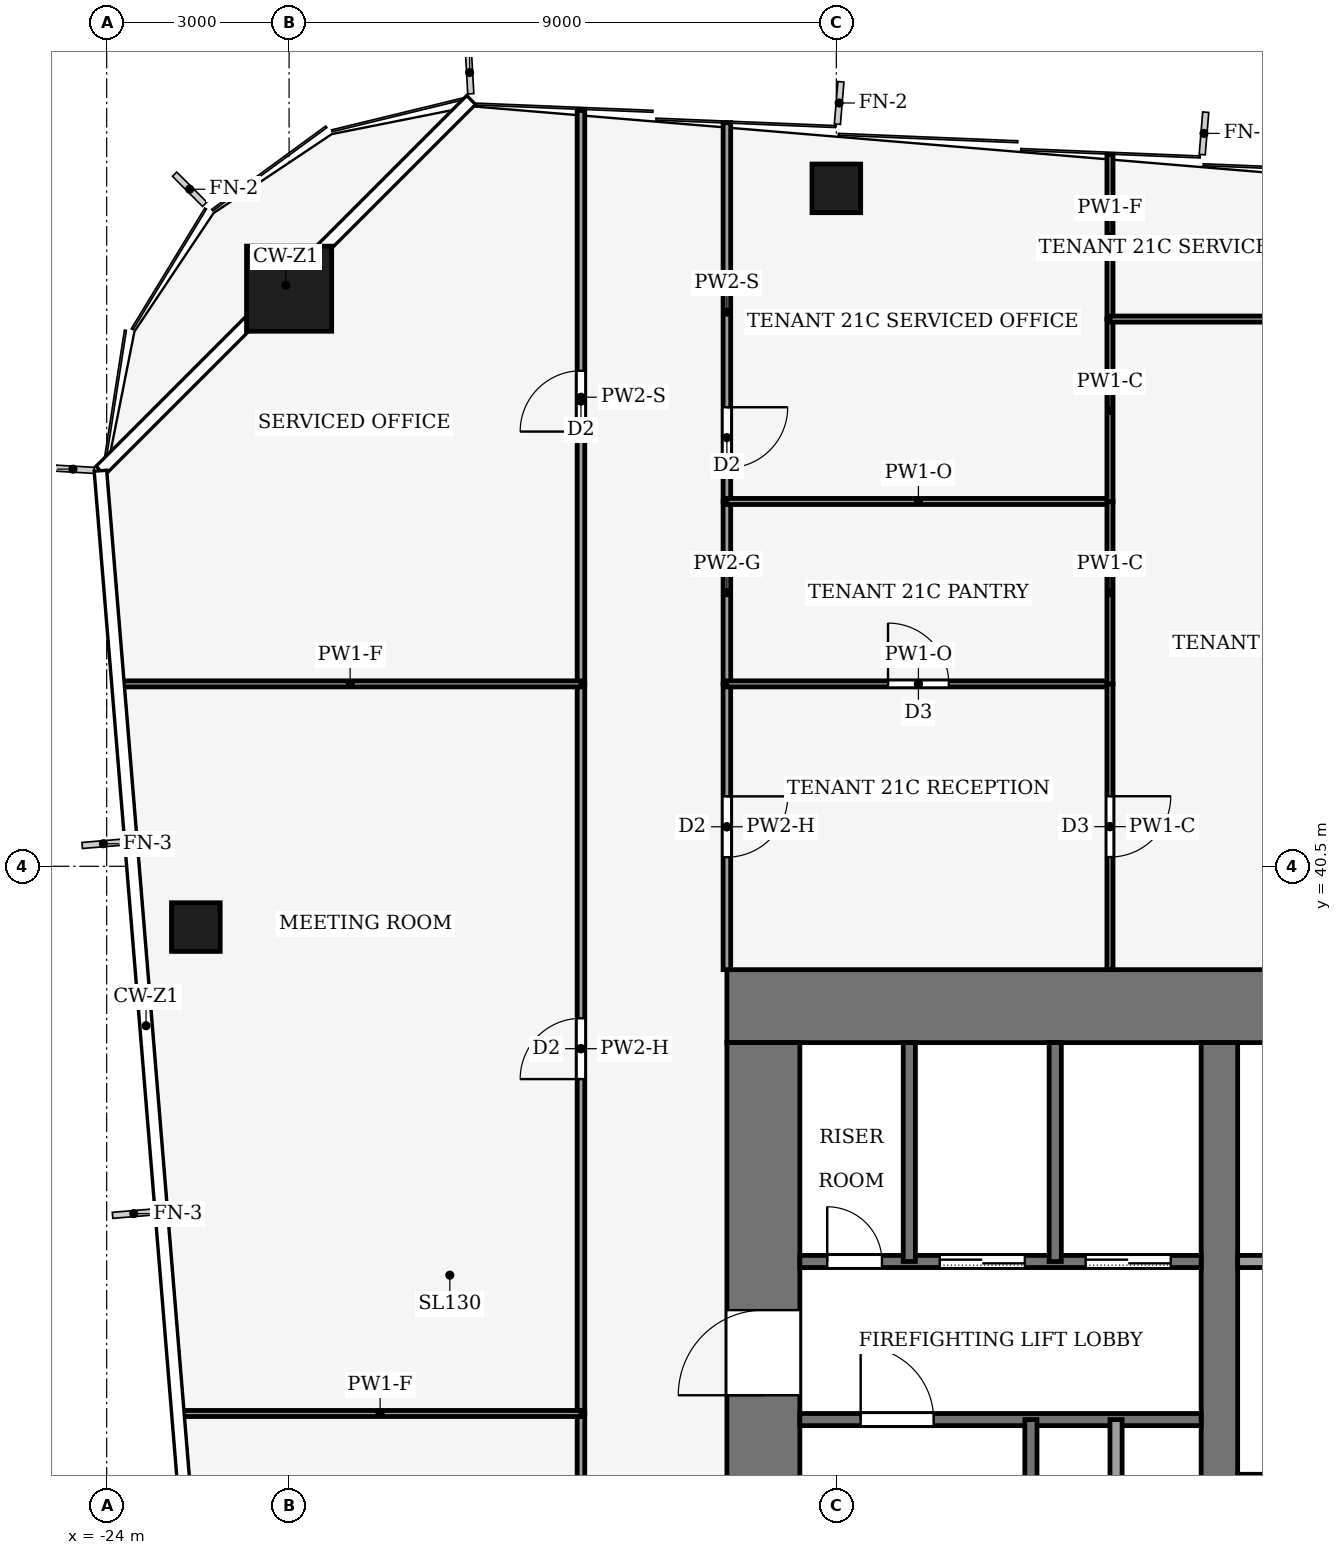
"""IFC4 building model, lengths in metres.
Left out: names, types, materials, properties, quantities, classifications, styles, units other than length and angle.
Written with IfcOpenShell. Run it as: python <this file> out.ifc"""

import sys

from ifc_helpers import new_model, si_unit, direction, frame, frame_2d, origin, origin_2d, place, context, subcontext, project, spatial, rectangle, hollow_rectangle, extrude, element, fill, save


model = new_model("IFC4")
c1 = context("Model", 3, precision=1e-05, world=origin(), true_north=direction((0.0, 1.0)))
c2 = subcontext(c1, "Body", "Model", "MODEL_VIEW")
j1 = project(units=[si_unit("LENGTHUNIT", "METRE"), si_unit("PLANEANGLEUNIT", "RADIAN")], contexts=[c1])
p1 = place(None, origin())
s1 = spatial("IfcSite", under=j1, at=p1, CompositionType="ELEMENT")
p2 = place(p1, origin())
s2 = spatial("IfcBuilding", under=s1, at=p2, CompositionType="ELEMENT")
p3 = place(p2, frame((0.0, 0.0, 94.0)))
s3 = spatial("IfcBuildingStorey", under=s2, at=p3, CompositionType="ELEMENT", Elevation=94.0)
p4 = place(p3, frame((-13.8, 38.2, -0.13), z_axis=(0.0, 0.0, 1.0), x_axis=(1.0, 0.0, 0.0)))
e1 = element("IfcWall", 1, at=p4, inside=s3, PredefinedType="SHEAR", context=c2, shape_type="SweptSolid", body=[
    extrude(rectangle(XDim=27.6, YDim=1.2, at=frame_2d((13.8, 0.0))), origin(), (0.0, 0.0, 1.0), 4.0),
])
p5 = place(p3, frame((-13.2, 18.4, -0.13), z_axis=(0.0, 0.0, 1.0), x_axis=(0.0, 1.0, 0.0)))
e2 = element("IfcWall", 2, at=p5, inside=s3, PredefinedType="SHEAR", context=c2, shape_type="SweptSolid", body=[
    extrude(rectangle(XDim=19.2, YDim=1.2, at=frame_2d((9.6, 0.0))), origin(), (0.0, 0.0, 1.0), 4.0),
])
p6 = place(p5, frame((2.8, 0.0, 0.13)))
e3 = element("IfcOpeningElement", 3, at=p6, cuts=e2, PredefinedType="OPENING", context=c2, shape_type="SweptSolid", body=[
    extrude(rectangle(XDim=2.4, YDim=2.4, at=frame_2d((1.2, 1.2))), frame((0.0, 0.61, 0.0), z_axis=(0.0, -1.0, 0.0), x_axis=(1.0, 0.0, 0.0)), (0.0, 0.0, 1.0), 1.22),
])
p7 = place(p5, frame((13.4, 0.0, 0.13)))
e4 = element("IfcOpeningElement", 4, at=p7, cuts=e2, PredefinedType="OPENING", context=c2, shape_type="SweptSolid", body=[
    extrude(rectangle(XDim=1.4, YDim=2.2, at=frame_2d((0.7, 1.1))), frame((0.0, 0.61, 0.0), z_axis=(0.0, -1.0, 0.0), x_axis=(1.0, 0.0, 0.0)), (0.0, 0.0, 1.0), 1.22),
])
p8 = place(p3, frame((-5.7, 18.4, -0.13), z_axis=(0.0, 0.0, 1.0), x_axis=(0.0, 1.0, 0.0)))
e5 = element("IfcWall", 5, at=p8, inside=s3, PredefinedType="SHEAR", context=c2, shape_type="SweptSolid", body=[
    extrude(rectangle(XDim=19.2, YDim=0.6, at=frame_2d((9.6, 0.0))), origin(), (0.0, 0.0, 1.0), 4.0),
])
p9 = place(p8, frame((8.35, 0.0, 0.13)))
e6 = element("IfcOpeningElement", 6, at=p9, cuts=e5, PredefinedType="OPENING", context=c2, shape_type="SweptSolid", body=[
    extrude(rectangle(XDim=0.9, YDim=2.1, at=frame_2d((0.45, 1.05))), frame((0.0, 0.31, 0.0), z_axis=(0.0, -1.0, 0.0), x_axis=(1.0, 0.0, 0.0)), (0.0, 0.0, 1.0), 0.62),
])
p10 = place(p3, frame((-21.0, 50.0, 0.0), z_axis=(0.0, 0.0, 1.0), x_axis=(1.0, 0.0, 0.0)))
e7 = element("IfcColumn", 7, at=p10, inside=s3, PredefinedType="COLUMN", context=c2, shape_type="SweptSolid", body=[
    extrude(hollow_rectangle(XDim=1.4, YDim=1.4, WallThickness=0.08, at=origin_2d()), origin(), (0.0, 0.0, 1.0), 4.0),
])
for number, where, z_axis, x_axis in (
    (8, (-12.0, 51.65, 0.0), (0.0, 0.0, 1.0), (1.0, 0.0, 0.0)),
    (9, (-22.534, 39.5, 0.0), (0.0, 0.0, 1.0), (1.0, 0.0, 0.0)),
):
    element("IfcColumn", number, at=place(p3, frame(where, z_axis=z_axis, x_axis=x_axis)), inside=s3, PredefinedType="COLUMN", context=c2, shape_type="SweptSolid", body=[
        extrude(hollow_rectangle(XDim=0.8, YDim=0.8, WallThickness=0.04, at=origin_2d()), origin(), (0.0, 0.0, 1.0), 4.0),
    ])
p11 = place(p3, frame((-12.6, 31.4, 0.0), z_axis=(0.0, 0.0, 1.0), x_axis=(1.0, 0.0, 0.0)))
e10 = element("IfcWall", 10, at=p11, inside=s3, PredefinedType="PARTITIONING", context=c2, shape_type="SweptSolid", body=[
    extrude(rectangle(XDim=6.6, YDim=0.2, at=frame_2d((3.3, 0.0))), origin(), (0.0, 0.0, 1.0), 3.87),
])
p12 = place(p11, frame((1.0, 0.0, 0.0)))
e11 = element("IfcOpeningElement", 11, at=p12, cuts=e10, PredefinedType="OPENING", context=c2, shape_type="SweptSolid", body=[
    extrude(rectangle(XDim=1.2, YDim=2.2, at=frame_2d((0.6, 1.1))), frame((0.0, 0.11, 0.0), z_axis=(0.0, -1.0, 0.0), x_axis=(1.0, 0.0, 0.0)), (0.0, 0.0, 1.0), 0.22),
])
p13 = place(p3, frame((-12.6, 34.0, 0.0), z_axis=(0.0, 0.0, 1.0), x_axis=(1.0, 0.0, 0.0)))
e12 = element("IfcWall", 12, at=p13, inside=s3, PredefinedType="PARTITIONING", context=c2, shape_type="SweptSolid", body=[
    extrude(rectangle(XDim=6.6, YDim=0.2, at=frame_2d((3.3, 0.0))), origin(), (0.0, 0.0, 1.0), 3.87),
])
p14 = place(p13, frame((4.7, 0.0, 0.0)))
e13 = element("IfcOpeningElement", 13, at=p14, cuts=e12, PredefinedType="OPENING", context=c2, shape_type="SweptSolid", body=[
    extrude(rectangle(XDim=1.4, YDim=2.2, at=frame_2d((0.7, 1.1))), frame((0.0, 0.11, 0.0), z_axis=(0.0, -1.0, 0.0), x_axis=(1.0, 0.0, 0.0)), (0.0, 0.0, 1.0), 0.22),
])
p15 = place(p13, frame((2.3, 0.0, 0.0)))
e14 = element("IfcOpeningElement", 14, at=p15, cuts=e12, PredefinedType="OPENING", context=c2, shape_type="SweptSolid", body=[
    extrude(rectangle(XDim=1.4, YDim=2.2, at=frame_2d((0.7, 1.1))), frame((0.0, 0.11, 0.0), z_axis=(0.0, -1.0, 0.0), x_axis=(1.0, 0.0, 0.0)), (0.0, 0.0, 1.0), 0.22),
])
p16 = place(p13, frame((0.45, 0.0, 0.0)))
e15 = element("IfcOpeningElement", 15, at=p16, cuts=e12, PredefinedType="OPENING", context=c2, shape_type="SweptSolid", body=[
    extrude(rectangle(XDim=0.9, YDim=2.1, at=frame_2d((0.45, 1.05))), frame((0.0, 0.11, 0.0), z_axis=(0.0, -1.0, 0.0), x_axis=(1.0, 0.0, 0.0)), (0.0, 0.0, 1.0), 0.22),
])
p17 = place(p3, frame((-5.4, 34.0, 0.0), z_axis=(0.0, 0.0, 1.0), x_axis=(1.0, 0.0, 0.0)))
e16 = element("IfcWall", 16, at=p17, inside=s3, PredefinedType="PARTITIONING", context=c2, shape_type="SweptSolid", body=[
    extrude(rectangle(XDim=10.8, YDim=0.2, at=frame_2d((5.4, 0.0))), origin(), (0.0, 0.0, 1.0), 3.87),
])
p18 = place(p17, frame((6.15, 0.0, 0.0)))
e17 = element("IfcOpeningElement", 17, at=p18, cuts=e16, PredefinedType="OPENING", context=c2, shape_type="SweptSolid", body=[
    extrude(rectangle(XDim=1.2, YDim=2.2, at=frame_2d((0.6, 1.1))), frame((0.0, 0.11, 0.0), z_axis=(0.0, -1.0, 0.0), x_axis=(1.0, 0.0, 0.0)), (0.0, 0.0, 1.0), 0.22),
])
p19 = place(p17, frame((8.95, 0.0, 0.0)))
e18 = element("IfcOpeningElement", 18, at=p19, cuts=e16, PredefinedType="OPENING", context=c2, shape_type="SweptSolid", body=[
    extrude(rectangle(XDim=1.0, YDim=2.1, at=frame_2d((0.5, 1.05))), frame((0.0, 0.11, 0.0), z_axis=(0.0, -1.0, 0.0), x_axis=(1.0, 0.0, 0.0)), (0.0, 0.0, 1.0), 0.22),
])
p20 = place(p3, frame((-10.8, 34.0, 0.0), z_axis=(0.0, 0.0, 1.0), x_axis=(0.0, 1.0, 0.0)))
e19 = element("IfcWall", 19, at=p20, inside=s3, PredefinedType="PARTITIONING", context=c2, shape_type="SweptSolid", body=[
    extrude(rectangle(XDim=3.6, YDim=0.2, at=frame_2d((1.8, 0.0))), origin(), (0.0, 0.0, 1.0), 3.87),
])
p21 = place(p3, frame((-8.8, 24.0, 0.0), z_axis=(0.0, 0.0, 1.0), x_axis=(0.0, 1.0, 0.0)))
e20 = element("IfcWall", 20, at=p21, inside=s3, PredefinedType="PARTITIONING", context=c2, shape_type="SweptSolid", body=[
    extrude(rectangle(XDim=7.4, YDim=0.2, at=frame_2d((3.7, 0.0))), origin(), (0.0, 0.0, 1.0), 3.87),
])
p22 = place(p3, frame((-8.4, 34.0, 0.0), z_axis=(0.0, 0.0, 1.0), x_axis=(0.0, 1.0, 0.0)))
e21 = element("IfcWall", 21, at=p22, inside=s3, PredefinedType="PARTITIONING", context=c2, shape_type="SweptSolid", body=[
    extrude(rectangle(XDim=3.6, YDim=0.2, at=frame_2d((1.8, 0.0))), origin(), (0.0, 0.0, 1.0), 3.87),
])
p23 = place(p3, frame((-7.4, 24.0, 0.0), z_axis=(0.0, 0.0, 1.0), x_axis=(0.0, 1.0, 0.0)))
e22 = element("IfcWall", 22, at=p23, inside=s3, PredefinedType="PARTITIONING", context=c2, shape_type="SweptSolid", body=[
    extrude(rectangle(XDim=7.4, YDim=0.2, at=frame_2d((3.7, 0.0))), origin(), (0.0, 0.0, 1.0), 3.87),
])
p24 = place(p3, frame((-16.2, 22.5, 0.0), z_axis=(0.0, 0.0, 1.0), x_axis=(0.0, 1.0, 0.0)))
e23 = element("IfcWall", 23, at=p24, inside=s3, PredefinedType="PARTITIONING", context=c2, shape_type="SweptSolid", body=[
    extrude(rectangle(XDim=9.0, YDim=0.125, at=frame_2d((4.5, 0.0))), origin(), (0.0, 0.0, 1.0), 3.48),
])
p25 = place(p24, frame((4.0, 0.0, 0.0)))
e24 = element("IfcOpeningElement", 24, at=p25, cuts=e23, PredefinedType="OPENING", context=c2, shape_type="SweptSolid", body=[
    extrude(rectangle(XDim=1.0, YDim=2.1, at=frame_2d((0.5, 1.05))), frame((0.0, 0.073, 0.0), z_axis=(0.0, -1.0, 0.0), x_axis=(1.0, 0.0, 0.0)), (0.0, 0.0, 1.0), 0.145),
])
p26 = place(p3, frame((-16.2, 31.5, 0.0), z_axis=(0.0, 0.0, 1.0), x_axis=(0.0, 1.0, 0.0)))
e25 = element("IfcWall", 25, at=p26, inside=s3, PredefinedType="PARTITIONING", context=c2, shape_type="SweptSolid", body=[
    extrude(rectangle(XDim=12.0, YDim=0.125, at=frame_2d((6.0, 0.0))), origin(), (0.0, 0.0, 1.0), 3.14),
])
p27 = place(p26, frame((5.5, 0.0, 0.0)))
e26 = element("IfcOpeningElement", 26, at=p27, cuts=e25, PredefinedType="OPENING", context=c2, shape_type="SweptSolid", body=[
    extrude(rectangle(XDim=1.0, YDim=2.1, at=frame_2d((0.5, 1.05))), frame((0.0, 0.073, 0.0), z_axis=(0.0, -1.0, 0.0), x_axis=(1.0, 0.0, 0.0)), (0.0, 0.0, 1.0), 0.145),
])
p28 = place(p3, frame((-16.2, 43.5, 0.0), z_axis=(0.0, 0.0, 1.0), x_axis=(0.0, 1.0, 0.0)))
e27 = element("IfcWall", 27, at=p28, inside=s3, PredefinedType="PARTITIONING", context=c2, shape_type="SweptSolid", body=[
    extrude(rectangle(XDim=9.43, YDim=0.125, at=frame_2d((4.715, 0.0))), origin(), (0.0, 0.0, 1.0), 3.04),
])
p29 = place(p28, frame((4.15, 0.0, 0.0)))
e28 = element("IfcOpeningElement", 28, at=p29, cuts=e27, PredefinedType="OPENING", context=c2, shape_type="SweptSolid", body=[
    extrude(rectangle(XDim=1.0, YDim=2.1, at=frame_2d((0.5, 1.05))), frame((0.0, 0.073, 0.0), z_axis=(0.0, -1.0, 0.0), x_axis=(1.0, 0.0, 0.0)), (0.0, 0.0, 1.0), 0.145),
])
p30 = place(p3, frame((-13.8, 43.5, 0.0), z_axis=(0.0, 0.0, 1.0), x_axis=(0.0, -1.0, 0.0)))
e29 = element("IfcWall", 29, at=p30, inside=s3, PredefinedType="PARTITIONING", context=c2, shape_type="SweptSolid", body=[
    extrude(rectangle(XDim=4.7, YDim=0.125, at=frame_2d((2.35, 0.0))), origin(), (0.0, 0.0, 1.0), 3.14),
])
p31 = place(p30, frame((1.85, 0.0, 0.0)))
e30 = element("IfcOpeningElement", 30, at=p31, cuts=e29, PredefinedType="OPENING", context=c2, shape_type="SweptSolid", body=[
    extrude(rectangle(XDim=1.0, YDim=2.1, at=frame_2d((0.5, 1.05))), frame((0.0, 0.073, 0.0), z_axis=(0.0, -1.0, 0.0), x_axis=(1.0, 0.0, 0.0)), (0.0, 0.0, 1.0), 0.145),
])
p32 = place(p3, frame((-13.8, 43.5, 0.0), z_axis=(0.0, 0.0, 1.0), x_axis=(0.0, 1.0, 0.0)))
e31 = element("IfcWall", 31, at=p32, inside=s3, PredefinedType="PARTITIONING", context=c2, shape_type="SweptSolid", body=[
    extrude(rectangle(XDim=3.0, YDim=0.125, at=frame_2d((1.5, 0.0))), origin(), (0.0, 0.0, 1.0), 3.87),
])
p33 = place(p3, frame((-13.8, 52.73, 0.0), z_axis=(0.0, 0.0, 1.0), x_axis=(0.0, -1.0, 0.0)))
e32 = element("IfcWall", 32, at=p33, inside=s3, PredefinedType="PARTITIONING", context=c2, shape_type="SweptSolid", body=[
    extrude(rectangle(XDim=6.23, YDim=0.125, at=frame_2d((3.115, 0.0))), origin(), (0.0, 0.0, 1.0), 3.04),
])
p34 = place(p33, frame((4.68, 0.0, 0.0)))
e33 = element("IfcOpeningElement", 33, at=p34, cuts=e32, PredefinedType="OPENING", context=c2, shape_type="SweptSolid", body=[
    extrude(rectangle(XDim=1.0, YDim=2.1, at=frame_2d((0.5, 1.05))), frame((0.0, 0.073, 0.0), z_axis=(0.0, -1.0, 0.0), x_axis=(1.0, 0.0, 0.0)), (0.0, 0.0, 1.0), 0.145),
])
p35 = place(p3, frame((-16.2, 31.5, 0.0), z_axis=(0.0, 0.0, 1.0), x_axis=(-1.0, 0.0, 0.0)))
e34 = element("IfcWall", 34, at=p35, inside=s3, PredefinedType="PARTITIONING", context=c2, shape_type="SweptSolid", body=[
    extrude(rectangle(XDim=6.606, YDim=0.1, at=frame_2d((3.303, 0.0))), origin(), (0.0, 0.0, 1.0), 3.04),
])
p36 = place(p3, frame((-16.2, 43.5, 0.0), z_axis=(0.0, 0.0, 1.0), x_axis=(-1.0, 0.0, 0.0)))
e35 = element("IfcWall", 35, at=p36, inside=s3, PredefinedType="PARTITIONING", context=c2, shape_type="SweptSolid", body=[
    extrude(rectangle(XDim=7.592, YDim=0.1, at=frame_2d((3.796, 0.0))), origin(), (0.0, 0.0, 1.0), 3.04),
])
p37 = place(p3, frame((-13.8, 43.5, 0.0), z_axis=(0.0, 0.0, 1.0), x_axis=(1.0, 0.0, 0.0)))
e36 = element("IfcWall", 36, at=p37, inside=s3, PredefinedType="PARTITIONING", context=c2, shape_type="SweptSolid", body=[
    extrude(rectangle(XDim=6.3, YDim=0.1, at=frame_2d((3.15, 0.0))), origin(), (0.0, 0.0, 1.0), 3.39),
])
p38 = place(p37, frame((2.65, 0.0, 0.0)))
e37 = element("IfcOpeningElement", 37, at=p38, cuts=e36, PredefinedType="OPENING", context=c2, shape_type="SweptSolid", body=[
    extrude(rectangle(XDim=1.0, YDim=2.1, at=frame_2d((0.5, 1.05))), frame((0.0, 0.06, 0.0), z_axis=(0.0, -1.0, 0.0), x_axis=(1.0, 0.0, 0.0)), (0.0, 0.0, 1.0), 0.12),
])
p39 = place(p3, frame((-7.5, 43.504, 0.0), z_axis=(0.0, 0.0, 1.0), x_axis=(0.0, -1.0, 0.0)))
e38 = element("IfcWall", 38, at=p39, inside=s3, PredefinedType="PARTITIONING", context=c2, shape_type="SweptSolid", body=[
    extrude(rectangle(XDim=4.704, YDim=0.1, at=frame_2d((2.352, 0.0))), origin(), (0.0, 0.0, 1.0), 3.87),
])
p40 = place(p39, frame((1.852, 0.0, 0.0)))
e39 = element("IfcOpeningElement", 39, at=p40, cuts=e38, PredefinedType="OPENING", context=c2, shape_type="SweptSolid", body=[
    extrude(rectangle(XDim=1.0, YDim=2.1, at=frame_2d((0.5, 1.05))), frame((0.0, 0.06, 0.0), z_axis=(0.0, -1.0, 0.0), x_axis=(1.0, 0.0, 0.0)), (0.0, 0.0, 1.0), 0.12),
])
p41 = place(p3, frame((-7.5, 46.5, 0.0), z_axis=(0.0, 0.0, 1.0), x_axis=(-1.0, 0.0, 0.0)))
e40 = element("IfcWall", 40, at=p41, inside=s3, PredefinedType="PARTITIONING", context=c2, shape_type="SweptSolid", body=[
    extrude(rectangle(XDim=6.3, YDim=0.1, at=frame_2d((3.15, 0.0))), origin(), (0.0, 0.0, 1.0), 3.39),
])
p42 = place(p3, frame((-7.5, 43.496, 0.0), z_axis=(0.0, 0.0, 1.0), x_axis=(0.0, 1.0, 0.0)))
e41 = element("IfcWall", 41, at=p42, inside=s3, PredefinedType="PARTITIONING", context=c2, shape_type="SweptSolid", body=[
    extrude(rectangle(XDim=3.008, YDim=0.1, at=frame_2d((1.504, 0.0))), origin(), (0.0, 0.0, 1.0), 3.87),
])
p43 = place(p3, frame((-7.5, 46.496, 0.0), z_axis=(0.0, 0.0, 1.0), x_axis=(0.0, 1.0, 0.0)))
e42 = element("IfcWall", 42, at=p43, inside=s3, PredefinedType="PARTITIONING", context=c2, shape_type="SweptSolid", body=[
    extrude(rectangle(XDim=3.004, YDim=0.1, at=frame_2d((1.502, 0.0))), origin(), (0.0, 0.0, 1.0), 3.87),
])
p44 = place(p3, frame((-7.5, 49.5, 0.0), z_axis=(0.0, 0.0, 1.0), x_axis=(0.0, 1.0, 0.0)))
e43 = element("IfcWall", 43, at=p44, inside=s3, PredefinedType="PARTITIONING", context=c2, shape_type="SweptSolid", body=[
    extrude(rectangle(XDim=2.705, YDim=0.1, at=frame_2d((1.353, 0.0))), origin(), (0.0, 0.0, 1.0), 3.04),
])
p45 = place(p3, frame((-7.5, 49.5, 0.0), z_axis=(0.0, 0.0, 1.0), x_axis=(1.0, 0.0, 0.0)))
e44 = element("IfcWall", 44, at=p45, inside=s3, PredefinedType="PARTITIONING", context=c2, shape_type="SweptSolid", body=[
    extrude(rectangle(XDim=7.5, YDim=0.1, at=frame_2d((3.75, 0.0))), origin(), (0.0, 0.0, 1.0), 3.39),
])
p46 = place(p45, frame((2.85, 0.0, 0.0)))
e45 = element("IfcOpeningElement", 45, at=p46, cuts=e44, PredefinedType="OPENING", context=c2, shape_type="SweptSolid", body=[
    extrude(rectangle(XDim=1.0, YDim=2.1, at=frame_2d((0.5, 1.05))), frame((0.0, 0.06, 0.0), z_axis=(0.0, -1.0, 0.0), x_axis=(1.0, 0.0, 0.0)), (0.0, 0.0, 1.0), 0.12),
])
p47 = place(p14, origin())
e46 = element("IfcDoor", 46, at=p47, inside=s3, OperationType="SLIDING_TO_LEFT", PredefinedType="DOOR", context=c2, shape_type="SweptSolid", body=[
    extrude(rectangle(XDim=1.4, YDim=2.2, at=frame_2d((0.7, 1.1))), frame((0.0, 0.025, 0.0), z_axis=(0.0, -1.0, 0.0), x_axis=(1.0, 0.0, 0.0)), (0.0, 0.0, 1.0), 0.05),
])
fill(e13, e46)
p48 = place(p15, origin())
e47 = element("IfcDoor", 47, at=p48, inside=s3, OperationType="SLIDING_TO_LEFT", PredefinedType="DOOR", context=c2, shape_type="SweptSolid", body=[
    extrude(rectangle(XDim=1.4, YDim=2.2, at=frame_2d((0.7, 1.1))), frame((0.0, 0.025, 0.0), z_axis=(0.0, -1.0, 0.0), x_axis=(1.0, 0.0, 0.0)), (0.0, 0.0, 1.0), 0.05),
])
fill(e14, e47)
p49 = place(p16, origin())
e48 = element("IfcDoor", 48, at=p49, inside=s3, OperationType="SINGLE_SWING_RIGHT", PredefinedType="DOOR", context=c2, shape_type="SweptSolid", body=[
    extrude(rectangle(XDim=0.9, YDim=2.1, at=frame_2d((0.45, 1.05))), frame((0.0, 0.025, 0.0), z_axis=(0.0, -1.0, 0.0), x_axis=(1.0, 0.0, 0.0)), (0.0, 0.0, 1.0), 0.05),
])
fill(e15, e48)
p50 = place(p12, origin())
e49 = element("IfcDoor", 49, at=p50, inside=s3, OperationType="SINGLE_SWING_RIGHT", PredefinedType="DOOR", context=c2, shape_type="SweptSolid", body=[
    extrude(rectangle(XDim=1.2, YDim=2.2, at=frame_2d((0.6, 1.1))), frame((0.0, 0.025, 0.0), z_axis=(0.0, -1.0, 0.0), x_axis=(1.0, 0.0, 0.0)), (0.0, 0.0, 1.0), 0.05),
])
fill(e11, e49)
p51 = place(p7, origin())
e50 = element("IfcDoor", 50, at=p51, inside=s3, OperationType="SINGLE_SWING_RIGHT", PredefinedType="DOOR", context=c2, shape_type="SweptSolid", body=[
    extrude(rectangle(XDim=1.4, YDim=2.2, at=frame_2d((0.7, 1.1))), frame((0.0, 0.025, 0.0), z_axis=(0.0, -1.0, 0.0), x_axis=(1.0, 0.0, 0.0)), (0.0, 0.0, 1.0), 0.05),
])
fill(e4, e50)
p52 = place(p27, origin())
e51 = element("IfcDoor", 51, at=p52, inside=s3, OperationType="SINGLE_SWING_RIGHT", PredefinedType="DOOR", context=c2, shape_type="SweptSolid", body=[
    extrude(rectangle(XDim=1.0, YDim=2.1, at=frame_2d((0.5, 1.05))), frame((0.0, 0.025, 0.0), z_axis=(0.0, -1.0, 0.0), x_axis=(1.0, 0.0, 0.0)), (0.0, 0.0, 1.0), 0.05),
])
fill(e26, e51)
p53 = place(p29, origin())
e52 = element("IfcDoor", 52, at=p53, inside=s3, OperationType="SINGLE_SWING_LEFT", PredefinedType="DOOR", context=c2, shape_type="SweptSolid", body=[
    extrude(rectangle(XDim=1.0, YDim=2.1, at=frame_2d((0.5, 1.05))), frame((0.0, 0.025, 0.0), z_axis=(0.0, -1.0, 0.0), x_axis=(1.0, 0.0, 0.0)), (0.0, 0.0, 1.0), 0.05),
])
fill(e28, e52)
p54 = place(p31, origin())
e53 = element("IfcDoor", 53, at=p54, inside=s3, OperationType="SINGLE_SWING_LEFT", PredefinedType="DOOR", context=c2, shape_type="SweptSolid", body=[
    extrude(rectangle(XDim=1.0, YDim=2.1, at=frame_2d((0.5, 1.05))), frame((0.0, 0.025, 0.0), z_axis=(0.0, -1.0, 0.0), x_axis=(1.0, 0.0, 0.0)), (0.0, 0.0, 1.0), 0.05),
])
fill(e30, e53)
p55 = place(p34, origin())
e54 = element("IfcDoor", 54, at=p55, inside=s3, OperationType="SINGLE_SWING_RIGHT", PredefinedType="DOOR", context=c2, shape_type="SweptSolid", body=[
    extrude(rectangle(XDim=1.0, YDim=2.1, at=frame_2d((0.5, 1.05))), frame((0.0, 0.025, 0.0), z_axis=(0.0, -1.0, 0.0), x_axis=(1.0, 0.0, 0.0)), (0.0, 0.0, 1.0), 0.05),
])
fill(e33, e54)
p56 = place(p38, origin())
e55 = element("IfcDoor", 55, at=p56, inside=s3, OperationType="SINGLE_SWING_LEFT", PredefinedType="DOOR", context=c2, shape_type="SweptSolid", body=[
    extrude(rectangle(XDim=1.0, YDim=2.1, at=frame_2d((0.5, 1.05))), frame((0.0, 0.025, 0.0), z_axis=(0.0, -1.0, 0.0), x_axis=(1.0, 0.0, 0.0)), (0.0, 0.0, 1.0), 0.05),
])
fill(e37, e55)
p57 = place(p40, origin())
e56 = element("IfcDoor", 56, at=p57, inside=s3, OperationType="SINGLE_SWING_RIGHT", PredefinedType="DOOR", context=c2, shape_type="SweptSolid", body=[
    extrude(rectangle(XDim=1.0, YDim=2.1, at=frame_2d((0.5, 1.05))), frame((0.0, 0.025, 0.0), z_axis=(0.0, -1.0, 0.0), x_axis=(1.0, 0.0, 0.0)), (0.0, 0.0, 1.0), 0.05),
])
fill(e39, e56)
save(model, sys.argv[1])
